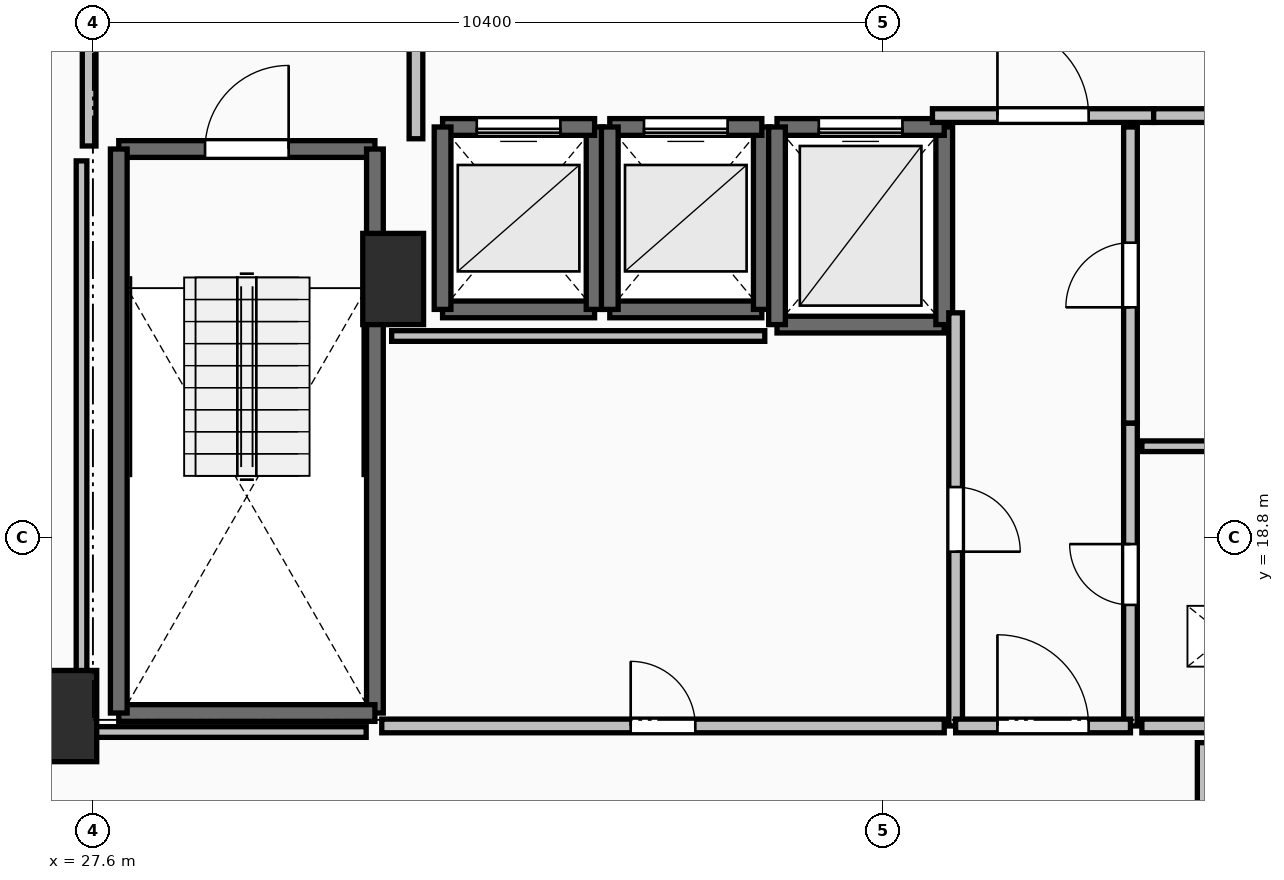
"""IFC4 building model, lengths in metres.
Left out: names, types, materials, properties, quantities, classifications, styles, units other than length and angle.
Written with IfcOpenShell. Run it as: python <this file> out.ifc"""

import sys

from ifc_helpers import new_model, si_unit, direction, frame, frame_2d, origin, origin_2d, place, context, subcontext, project, spatial, rectangle, extrude, element, fill, save


model = new_model("IFC4")
c1 = context("Model", 3, precision=1e-05, world=origin(), true_north=direction((0.0, 1.0)))
c2 = subcontext(c1, "Body", "Model", "MODEL_VIEW")
j1 = project(units=[si_unit("LENGTHUNIT", "METRE"), si_unit("PLANEANGLEUNIT", "RADIAN")], contexts=[c1])
p1 = place(None, origin())
s1 = spatial("IfcSite", under=j1, at=p1, CompositionType="ELEMENT")
p2 = place(p1, origin())
s2 = spatial("IfcBuilding", under=s1, at=p2, CompositionType="ELEMENT")
p3 = place(p2, frame((0.0, 0.0, 150.1)))
s3 = spatial("IfcBuildingStorey", under=s2, at=p3, CompositionType="ELEMENT", Elevation=150.1)
for number, where, z_axis, x_axis in (
    (1, (27.25, 16.45, 0.0), (0.0, 0.0, 1.0), (1.0, 0.0, 0.0)),
    (2, (31.55, 22.2, 0.0), (0.0, 0.0, 1.0), (1.0, 0.0, 0.0)),
):
    element("IfcColumn", number, at=place(p3, frame(where, z_axis=z_axis, x_axis=x_axis)), inside=s3, PredefinedType="PILASTER", context=c2, shape_type="SweptSolid", body=[
        extrude(rectangle(XDim=0.8, YDim=1.2, at=origin_2d()), origin(), (0.0, 0.0, 1.0), 3.5),
    ])
p4 = place(p3, frame((27.94, 23.91, 0.0), z_axis=(0.0, 0.0, 1.0), x_axis=(1.0, 0.0, 0.0)))
e3 = element("IfcWall", 3, at=p4, inside=s3, PredefinedType="SOLIDWALL", context=c2, shape_type="SweptSolid", body=[
    extrude(rectangle(XDim=3.37, YDim=0.22, at=frame_2d((1.685, 0.0))), origin(), (0.0, 0.0, 1.0), 3.24),
])
p5 = place(p4, frame((1.135, 0.0, 0.0)))
e4 = element("IfcOpeningElement", 4, at=p5, cuts=e3, PredefinedType="OPENING", context=c2, shape_type="SweptSolid", body=[
    extrude(rectangle(XDim=1.1, YDim=2.15, at=frame_2d((0.55, 1.075))), frame((0.0, 0.125, 0.0), z_axis=(0.0, -1.0, 0.0), x_axis=(1.0, 0.0, 0.0)), (0.0, 0.0, 1.0), 0.25),
])
p6 = place(p3, frame((31.31, 23.91, 0.0), z_axis=(0.0, 0.0, 1.0), x_axis=(0.0, -1.0, 0.0)))
e5 = element("IfcWall", 5, at=p6, inside=s3, PredefinedType="SOLIDWALL", context=c2, shape_type="SweptSolid", body=[
    extrude(rectangle(XDim=7.42, YDim=0.22, at=frame_2d((3.71, 0.0))), origin(), (0.0, 0.0, 1.0), 3.24),
])
p7 = place(p3, frame((31.31, 16.49, 0.0), z_axis=(0.0, 0.0, 1.0), x_axis=(-1.0, 0.0, 0.0)))
e6 = element("IfcWall", 6, at=p7, inside=s3, PredefinedType="SOLIDWALL", context=c2, shape_type="SweptSolid", body=[
    extrude(rectangle(XDim=3.37, YDim=0.22, at=frame_2d((1.685, 0.0))), origin(), (0.0, 0.0, 1.0), 3.24),
])
p8 = place(p3, frame((27.94, 16.49, 0.0), z_axis=(0.0, 0.0, 1.0), x_axis=(0.0, 1.0, 0.0)))
e7 = element("IfcWall", 7, at=p8, inside=s3, PredefinedType="SOLIDWALL", context=c2, shape_type="SweptSolid", body=[
    extrude(rectangle(XDim=7.42, YDim=0.22, at=frame_2d((3.71, 0.0))), origin(), (0.0, 0.0, 1.0), 3.24),
])
p9 = place(p3, frame((32.2, 21.8, 0.0), z_axis=(0.0, 0.0, 1.0), x_axis=(1.0, 0.0, 0.0)))
e8 = element("IfcWall", 8, at=p9, inside=s3, PredefinedType="SOLIDWALL", context=c2, shape_type="SweptSolid", body=[
    extrude(rectangle(XDim=2.0, YDim=0.22, at=frame_2d((1.0, 0.0))), origin(), (0.0, 0.0, 1.0), 3.24),
])
p10 = place(p3, frame((34.2, 21.8, 0.0), z_axis=(0.0, 0.0, 1.0), x_axis=(0.0, 1.0, 0.0)))
e9 = element("IfcWall", 9, at=p10, inside=s3, PredefinedType="SOLIDWALL", context=c2, shape_type="SweptSolid", body=[
    extrude(rectangle(XDim=2.4, YDim=0.22, at=frame_2d((1.2, 0.0))), origin(), (0.0, 0.0, 1.0), 3.24),
])
p11 = place(p3, frame((34.2, 24.2, 0.0), z_axis=(0.0, 0.0, 1.0), x_axis=(-1.0, 0.0, 0.0)))
e10 = element("IfcWall", 10, at=p11, inside=s3, PredefinedType="SOLIDWALL", context=c2, shape_type="SweptSolid", body=[
    extrude(rectangle(XDim=2.0, YDim=0.22, at=frame_2d((1.0, 0.0))), origin(), (0.0, 0.0, 1.0), 3.24),
])
p12 = place(p11, frame((0.45, 0.0, 0.0)))
e11 = element("IfcOpeningElement", 11, at=p12, cuts=e10, PredefinedType="OPENING", context=c2, shape_type="SweptSolid", body=[
    extrude(rectangle(XDim=1.1, YDim=2.2, at=frame_2d((0.55, 1.1))), frame((0.0, 0.125, 0.0), z_axis=(0.0, -1.0, 0.0), x_axis=(1.0, 0.0, 0.0)), (0.0, 0.0, 1.0), 0.25),
])
p13 = place(p3, frame((32.2, 24.2, 0.0), z_axis=(0.0, 0.0, 1.0), x_axis=(0.0, -1.0, 0.0)))
e12 = element("IfcWall", 12, at=p13, inside=s3, PredefinedType="SOLIDWALL", context=c2, shape_type="SweptSolid", body=[
    extrude(rectangle(XDim=2.4, YDim=0.22, at=frame_2d((1.2, 0.0))), origin(), (0.0, 0.0, 1.0), 3.24),
])
p14 = place(p3, frame((34.4, 21.8, 0.0), z_axis=(0.0, 0.0, 1.0), x_axis=(1.0, 0.0, 0.0)))
e13 = element("IfcWall", 13, at=p14, inside=s3, PredefinedType="SOLIDWALL", context=c2, shape_type="SweptSolid", body=[
    extrude(rectangle(XDim=2.0, YDim=0.22, at=frame_2d((1.0, 0.0))), origin(), (0.0, 0.0, 1.0), 3.24),
])
p15 = place(p3, frame((36.4, 21.8, 0.0), z_axis=(0.0, 0.0, 1.0), x_axis=(0.0, 1.0, 0.0)))
e14 = element("IfcWall", 14, at=p15, inside=s3, PredefinedType="SOLIDWALL", context=c2, shape_type="SweptSolid", body=[
    extrude(rectangle(XDim=2.4, YDim=0.22, at=frame_2d((1.2, 0.0))), origin(), (0.0, 0.0, 1.0), 3.24),
])
p16 = place(p3, frame((36.4, 24.2, 0.0), z_axis=(0.0, 0.0, 1.0), x_axis=(-1.0, 0.0, 0.0)))
e15 = element("IfcWall", 15, at=p16, inside=s3, PredefinedType="SOLIDWALL", context=c2, shape_type="SweptSolid", body=[
    extrude(rectangle(XDim=2.0, YDim=0.22, at=frame_2d((1.0, 0.0))), origin(), (0.0, 0.0, 1.0), 3.24),
])
p17 = place(p16, frame((0.45, 0.0, 0.0)))
e16 = element("IfcOpeningElement", 16, at=p17, cuts=e15, PredefinedType="OPENING", context=c2, shape_type="SweptSolid", body=[
    extrude(rectangle(XDim=1.1, YDim=2.2, at=frame_2d((0.55, 1.1))), frame((0.0, 0.125, 0.0), z_axis=(0.0, -1.0, 0.0), x_axis=(1.0, 0.0, 0.0)), (0.0, 0.0, 1.0), 0.25),
])
p18 = place(p3, frame((34.4, 24.2, 0.0), z_axis=(0.0, 0.0, 1.0), x_axis=(0.0, -1.0, 0.0)))
e17 = element("IfcWall", 17, at=p18, inside=s3, PredefinedType="SOLIDWALL", context=c2, shape_type="SweptSolid", body=[
    extrude(rectangle(XDim=2.4, YDim=0.22, at=frame_2d((1.2, 0.0))), origin(), (0.0, 0.0, 1.0), 3.24),
])
p19 = place(p3, frame((36.6, 21.6, 0.0), z_axis=(0.0, 0.0, 1.0), x_axis=(1.0, 0.0, 0.0)))
e18 = element("IfcWall", 18, at=p19, inside=s3, PredefinedType="SOLIDWALL", context=c2, shape_type="SweptSolid", body=[
    extrude(rectangle(XDim=2.2, YDim=0.22, at=frame_2d((1.1, 0.0))), origin(), (0.0, 0.0, 1.0), 3.24),
])
p20 = place(p3, frame((38.8, 21.6, 0.0), z_axis=(0.0, 0.0, 1.0), x_axis=(0.0, 1.0, 0.0)))
e19 = element("IfcWall", 19, at=p20, inside=s3, PredefinedType="SOLIDWALL", context=c2, shape_type="SweptSolid", body=[
    extrude(rectangle(XDim=2.6, YDim=0.22, at=frame_2d((1.3, 0.0))), origin(), (0.0, 0.0, 1.0), 3.24),
])
p21 = place(p3, frame((38.8, 24.2, 0.0), z_axis=(0.0, 0.0, 1.0), x_axis=(-1.0, 0.0, 0.0)))
e20 = element("IfcWall", 20, at=p21, inside=s3, PredefinedType="SOLIDWALL", context=c2, shape_type="SweptSolid", body=[
    extrude(rectangle(XDim=2.2, YDim=0.22, at=frame_2d((1.1, 0.0))), origin(), (0.0, 0.0, 1.0), 3.24),
])
p22 = place(p21, frame((0.55, 0.0, 0.0)))
e21 = element("IfcOpeningElement", 21, at=p22, cuts=e20, PredefinedType="OPENING", context=c2, shape_type="SweptSolid", body=[
    extrude(rectangle(XDim=1.1, YDim=2.2, at=frame_2d((0.55, 1.1))), frame((0.0, 0.125, 0.0), z_axis=(0.0, -1.0, 0.0), x_axis=(1.0, 0.0, 0.0)), (0.0, 0.0, 1.0), 0.25),
])
p23 = place(p3, frame((36.6, 24.2, 0.0), z_axis=(0.0, 0.0, 1.0), x_axis=(0.0, -1.0, 0.0)))
e22 = element("IfcWall", 22, at=p23, inside=s3, PredefinedType="SOLIDWALL", context=c2, shape_type="SweptSolid", body=[
    extrude(rectangle(XDim=2.6, YDim=0.22, at=frame_2d((1.3, 0.0))), origin(), (0.0, 0.0, 1.0), 3.24),
])
p24 = place(p3, frame((31.85, 24.045, 0.0), z_axis=(0.0, 0.0, 1.0), x_axis=(0.0, 1.0, 0.0)))
e23 = element("IfcWall", 23, at=p24, inside=s3, PredefinedType="PARTITIONING", context=c2, shape_type="SweptSolid", body=[
    extrude(rectangle(XDim=3.91, YDim=0.18, at=frame_2d((1.955, 0.0))), origin(), (0.0, 0.0, 1.0), 3.24),
])
p25 = place(p24, frame((1.355, 0.0, 0.0)))
e24 = element("IfcOpeningElement", 24, at=p25, cuts=e23, PredefinedType="OPENING", context=c2, shape_type="SweptSolid", body=[
    extrude(rectangle(XDim=1.2, YDim=2.15, at=frame_2d((0.6, 1.075))), frame((0.0, 0.105, 0.0), z_axis=(0.0, -1.0, 0.0), x_axis=(1.0, 0.0, 0.0)), (0.0, 0.0, 1.0), 0.21),
])
p26 = place(p3, frame((27.55, 28.0, 0.0), z_axis=(0.0, 0.0, 1.0), x_axis=(0.0, -1.0, 0.0)))
e25 = element("IfcWall", 25, at=p26, inside=s3, PredefinedType="PARTITIONING", context=c2, shape_type="SweptSolid", body=[
    extrude(rectangle(XDim=4.05, YDim=0.18, at=frame_2d((2.025, 0.0))), origin(), (0.0, 0.0, 1.0), 3.24),
])
p27 = place(p26, frame((1.425, 0.0, 0.0)))
e26 = element("IfcOpeningElement", 26, at=p27, cuts=e25, PredefinedType="OPENING", context=c2, shape_type="SweptSolid", body=[
    extrude(rectangle(XDim=1.2, YDim=2.15, at=frame_2d((0.6, 1.075))), frame((0.0, 0.105, 0.0), z_axis=(0.0, -1.0, 0.0), x_axis=(1.0, 0.0, 0.0)), (0.0, 0.0, 1.0), 0.21),
])
p28 = place(p3, frame((38.645, 24.35, 0.0), z_axis=(0.0, 0.0, 1.0), x_axis=(1.0, 0.0, 0.0)))
e27 = element("IfcWall", 27, at=p28, inside=s3, PredefinedType="PARTITIONING", context=c2, shape_type="SweptSolid", body=[
    extrude(rectangle(XDim=2.91, YDim=0.18, at=frame_2d((1.455, 0.0))), origin(), (0.0, 0.0, 1.0), 3.24),
])
p29 = place(p28, frame((0.855, 0.0, 0.0)))
e28 = element("IfcOpeningElement", 28, at=p29, cuts=e27, PredefinedType="OPENING", context=c2, shape_type="SweptSolid", body=[
    extrude(rectangle(XDim=1.2, YDim=2.15, at=frame_2d((0.6, 1.075))), frame((0.0, 0.105, 0.0), z_axis=(0.0, -1.0, 0.0), x_axis=(1.0, 0.0, 0.0)), (0.0, 0.0, 1.0), 0.21),
])
p30 = place(p3, frame((41.555, 24.35, 0.0), z_axis=(0.0, 0.0, 1.0), x_axis=(1.0, 0.0, 0.0)))
e29 = element("IfcWall", 29, at=p30, inside=s3, PredefinedType="PARTITIONING", context=c2, shape_type="SweptSolid", body=[
    extrude(rectangle(XDim=2.445, YDim=0.18, at=frame_2d((1.223, 0.0))), origin(), (0.0, 0.0, 1.0), 3.24),
])
p31 = place(p30, frame((0.798, 0.0, 0.0)))
e30 = element("IfcOpeningElement", 30, at=p31, cuts=e29, PredefinedType="OPENING", context=c2, shape_type="SweptSolid", body=[
    extrude(rectangle(XDim=0.85, YDim=2.1, at=frame_2d((0.425, 1.05))), frame((0.0, 0.105, 0.0), z_axis=(0.0, -1.0, 0.0), x_axis=(1.0, 0.0, 0.0)), (0.0, 0.0, 1.0), 0.21),
])
p32 = place(p3, frame((41.25, 16.32, 0.0), z_axis=(0.0, 0.0, 1.0), x_axis=(0.0, 1.0, 0.0)))
e31 = element("IfcWall", 31, at=p32, inside=s3, PredefinedType="PARTITIONING", context=c2, shape_type="SweptSolid", body=[
    extrude(rectangle(XDim=3.985, YDim=0.18, at=frame_2d((1.992, 0.0))), origin(), (0.0, 0.0, 1.0), 3.24),
])
p33 = place(p32, frame((1.593, 0.0, 0.0)))
e32 = element("IfcOpeningElement", 32, at=p33, cuts=e31, PredefinedType="OPENING", context=c2, shape_type="SweptSolid", body=[
    extrude(rectangle(XDim=0.8, YDim=2.05, at=frame_2d((0.4, 1.025))), frame((0.0, 0.105, 0.0), z_axis=(0.0, -1.0, 0.0), x_axis=(1.0, 0.0, 0.0)), (0.0, 0.0, 1.0), 0.21),
])
p34 = place(p3, frame((41.25, 20.305, 0.0), z_axis=(0.0, 0.0, 1.0), x_axis=(0.0, 1.0, 0.0)))
e33 = element("IfcWall", 33, at=p34, inside=s3, PredefinedType="PARTITIONING", context=c2, shape_type="SweptSolid", body=[
    extrude(rectangle(XDim=3.895, YDim=0.18, at=frame_2d((1.948, 0.0))), origin(), (0.0, 0.0, 1.0), 3.24),
])
p35 = place(p34, frame((1.522, 0.0, 0.0)))
e34 = element("IfcOpeningElement", 34, at=p35, cuts=e33, PredefinedType="OPENING", context=c2, shape_type="SweptSolid", body=[
    extrude(rectangle(XDim=0.85, YDim=2.1, at=frame_2d((0.425, 1.05))), frame((0.0, 0.105, 0.0), z_axis=(0.0, -1.0, 0.0), x_axis=(1.0, 0.0, 0.0)), (0.0, 0.0, 1.0), 0.21),
])
p36 = place(p3, frame((38.95, 21.755, 0.0), z_axis=(0.0, 0.0, 1.0), x_axis=(0.0, -1.0, 0.0)))
e35 = element("IfcWall", 35, at=p36, inside=s3, PredefinedType="PARTITIONING", context=c2, shape_type="SweptSolid", body=[
    extrude(rectangle(XDim=5.435, YDim=0.18, at=frame_2d((2.717, 0.0))), origin(), (0.0, 0.0, 1.0), 3.24),
])
p37 = place(p36, frame((2.292, 0.0, 0.0)))
e36 = element("IfcOpeningElement", 36, at=p37, cuts=e35, PredefinedType="OPENING", context=c2, shape_type="SweptSolid", body=[
    extrude(rectangle(XDim=0.85, YDim=2.1, at=frame_2d((0.425, 1.05))), frame((0.0, 0.105, 0.0), z_axis=(0.0, -1.0, 0.0), x_axis=(1.0, 0.0, 0.0)), (0.0, 0.0, 1.0), 0.21),
])
p38 = place(p3, frame((38.95, 16.32, 0.0), z_axis=(0.0, 0.0, 1.0), x_axis=(1.0, 0.0, 0.0)))
e37 = element("IfcWall", 37, at=p38, inside=s3, PredefinedType="PARTITIONING", context=c2, shape_type="SweptSolid", body=[
    extrude(rectangle(XDim=2.3, YDim=0.18, at=frame_2d((1.15, 0.0))), origin(), (0.0, 0.0, 1.0), 3.24),
])
p39 = place(p38, frame((0.55, 0.0, 0.0)))
e38 = element("IfcOpeningElement", 38, at=p39, cuts=e37, PredefinedType="OPENING", context=c2, shape_type="SweptSolid", body=[
    extrude(rectangle(XDim=1.2, YDim=2.15, at=frame_2d((0.6, 1.075))), frame((0.0, 0.105, 0.0), z_axis=(0.0, -1.0, 0.0), x_axis=(1.0, 0.0, 0.0)), (0.0, 0.0, 1.0), 0.21),
])
p40 = place(p3, frame((44.6, 20.0, 0.0), z_axis=(0.0, 0.0, 1.0), x_axis=(-1.0, 0.0, 0.0)))
e39 = element("IfcWall", 39, at=p40, inside=s3, PredefinedType="PARTITIONING", context=c2, shape_type="SweptSolid", body=[
    extrude(rectangle(XDim=3.2, YDim=0.14, at=frame_2d((1.6, 0.0))), origin(), (0.0, 0.0, 1.0), 3.24),
])
p41 = place(p3, frame((41.4, 16.32, 0.0), z_axis=(0.0, 0.0, 1.0), x_axis=(1.0, 0.0, 0.0)))
e40 = element("IfcWall", 40, at=p41, inside=s3, PredefinedType="PARTITIONING", context=c2, shape_type="SweptSolid", body=[
    extrude(rectangle(XDim=3.2, YDim=0.18, at=frame_2d((1.6, 0.0))), origin(), (0.0, 0.0, 1.0), 3.24),
])
p42 = place(p41, frame((1.2, 0.0, 0.0)))
e41 = element("IfcOpeningElement", 41, at=p42, cuts=e40, PredefinedType="OPENING", context=c2, shape_type="SweptSolid", body=[
    extrude(rectangle(XDim=0.8, YDim=2.05, at=frame_2d((0.4, 1.025))), frame((0.0, 0.105, 0.0), z_axis=(0.0, -1.0, 0.0), x_axis=(1.0, 0.0, 0.0)), (0.0, 0.0, 1.0), 0.21),
])
p43 = place(p3, frame((31.4, 16.32, 0.0), z_axis=(0.0, 0.0, 1.0), x_axis=(1.0, 0.0, 0.0)))
e42 = element("IfcWall", 42, at=p43, inside=s3, PredefinedType="PARTITIONING", context=c2, shape_type="SweptSolid", body=[
    extrude(rectangle(XDim=7.4, YDim=0.18, at=frame_2d((3.7, 0.0))), origin(), (0.0, 0.0, 1.0), 3.24),
])
p44 = place(p43, frame((3.275, 0.0, 0.0)))
e43 = element("IfcOpeningElement", 43, at=p44, cuts=e42, PredefinedType="OPENING", context=c2, shape_type="SweptSolid", body=[
    extrude(rectangle(XDim=0.85, YDim=2.1, at=frame_2d((0.425, 1.05))), frame((0.0, 0.105, 0.0), z_axis=(0.0, -1.0, 0.0), x_axis=(1.0, 0.0, 0.0)), (0.0, 0.0, 1.0), 0.21),
])
p45 = place(p3, frame((36.439, 21.45, 0.0), z_axis=(0.0, 0.0, 1.0), x_axis=(-1.0, 0.0, 0.0)))
e44 = element("IfcWall", 44, at=p45, inside=s3, PredefinedType="PARTITIONING", context=c2, shape_type="SweptSolid", body=[
    extrude(rectangle(XDim=4.909, YDim=0.14, at=frame_2d((2.455, 0.0))), origin(), (0.0, 0.0, 1.0), 3.24),
])
p46 = place(p3, frame((27.45, 23.754, 0.0), z_axis=(0.0, 0.0, 1.0), x_axis=(0.0, -1.0, 0.0)))
e45 = element("IfcWall", 45, at=p46, inside=s3, PredefinedType="PARTITIONING", context=c2, shape_type="SweptSolid", body=[
    extrude(rectangle(XDim=7.514, YDim=0.14, at=frame_2d((3.757, 0.0))), origin(), (0.0, 0.0, 1.0), 2.432),
])
p47 = place(p3, frame((27.45, 16.24, 0.0), z_axis=(0.0, 0.0, 1.0), x_axis=(1.0, 0.0, 0.0)))
e46 = element("IfcWall", 46, at=p47, inside=s3, PredefinedType="PARTITIONING", context=c2, shape_type="SweptSolid", body=[
    extrude(rectangle(XDim=3.745, YDim=0.14, at=frame_2d((1.873, 0.0))), origin(), (0.0, 0.0, 1.0), 2.432),
])
p48 = place(p3, frame((42.2, 16.1, 0.0), z_axis=(0.0, 0.0, 1.0), x_axis=(0.0, -1.0, 0.0)))
e47 = element("IfcWall", 47, at=p48, inside=s3, PredefinedType="PARTITIONING", context=c2, shape_type="SweptSolid", body=[
    extrude(rectangle(XDim=1.83, YDim=0.14, at=frame_2d((0.915, 0.0))), origin(), (0.0, 0.0, 1.0), 2.886),
])
p49 = place(p5, origin())
e48 = element("IfcDoor", 48, at=p49, inside=s3, OperationType="SINGLE_SWING_RIGHT", PredefinedType="DOOR", context=c2, shape_type="SweptSolid", body=[
    extrude(rectangle(XDim=1.1, YDim=2.15, at=frame_2d((0.55, 1.075))), frame((0.0, 0.025, 0.0), z_axis=(0.0, -1.0, 0.0), x_axis=(1.0, 0.0, 0.0)), (0.0, 0.0, 1.0), 0.05),
])
fill(e4, e48)
p50 = place(p12, origin())
e49 = element("IfcDoor", 49, at=p50, inside=s3, OperationType="SLIDING_TO_LEFT", PredefinedType="DOOR", context=c2, shape_type="SweptSolid", body=[
    extrude(rectangle(XDim=1.1, YDim=2.2, at=frame_2d((0.55, 1.1))), frame((0.0, 0.025, 0.0), z_axis=(0.0, -1.0, 0.0), x_axis=(1.0, 0.0, 0.0)), (0.0, 0.0, 1.0), 0.05),
])
fill(e11, e49)
p51 = place(p17, origin())
e50 = element("IfcDoor", 50, at=p51, inside=s3, OperationType="SLIDING_TO_LEFT", PredefinedType="DOOR", context=c2, shape_type="SweptSolid", body=[
    extrude(rectangle(XDim=1.1, YDim=2.2, at=frame_2d((0.55, 1.1))), frame((0.0, 0.025, 0.0), z_axis=(0.0, -1.0, 0.0), x_axis=(1.0, 0.0, 0.0)), (0.0, 0.0, 1.0), 0.05),
])
fill(e16, e50)
p52 = place(p22, origin())
e51 = element("IfcDoor", 51, at=p52, inside=s3, OperationType="SLIDING_TO_LEFT", PredefinedType="DOOR", context=c2, shape_type="SweptSolid", body=[
    extrude(rectangle(XDim=1.1, YDim=2.2, at=frame_2d((0.55, 1.1))), frame((0.0, 0.025, 0.0), z_axis=(0.0, -1.0, 0.0), x_axis=(1.0, 0.0, 0.0)), (0.0, 0.0, 1.0), 0.05),
])
fill(e21, e51)
p53 = place(p29, origin())
e52 = element("IfcDoor", 52, at=p53, inside=s3, OperationType="SINGLE_SWING_LEFT", PredefinedType="DOOR", context=c2, shape_type="SweptSolid", body=[
    extrude(rectangle(XDim=1.2, YDim=2.15, at=frame_2d((0.6, 1.075))), frame((0.0, 0.025, 0.0), z_axis=(0.0, -1.0, 0.0), x_axis=(1.0, 0.0, 0.0)), (0.0, 0.0, 1.0), 0.05),
])
fill(e28, e52)
p54 = place(p33, origin())
e53 = element("IfcDoor", 53, at=p54, inside=s3, OperationType="SINGLE_SWING_RIGHT", PredefinedType="DOOR", context=c2, shape_type="SweptSolid", body=[
    extrude(rectangle(XDim=0.8, YDim=2.05, at=frame_2d((0.4, 1.025))), frame((0.0, 0.025, 0.0), z_axis=(0.0, -1.0, 0.0), x_axis=(1.0, 0.0, 0.0)), (0.0, 0.0, 1.0), 0.05),
])
fill(e32, e53)
p55 = place(p35, origin())
e54 = element("IfcDoor", 54, at=p55, inside=s3, OperationType="SINGLE_SWING_LEFT", PredefinedType="DOOR", context=c2, shape_type="SweptSolid", body=[
    extrude(rectangle(XDim=0.85, YDim=2.1, at=frame_2d((0.425, 1.05))), frame((0.0, 0.025, 0.0), z_axis=(0.0, -1.0, 0.0), x_axis=(1.0, 0.0, 0.0)), (0.0, 0.0, 1.0), 0.05),
])
fill(e34, e54)
p56 = place(p37, origin())
e55 = element("IfcDoor", 55, at=p56, inside=s3, OperationType="SINGLE_SWING_RIGHT", PredefinedType="DOOR", context=c2, shape_type="SweptSolid", body=[
    extrude(rectangle(XDim=0.85, YDim=2.1, at=frame_2d((0.425, 1.05))), frame((0.0, 0.025, 0.0), z_axis=(0.0, -1.0, 0.0), x_axis=(1.0, 0.0, 0.0)), (0.0, 0.0, 1.0), 0.05),
])
fill(e36, e55)
p57 = place(p39, origin())
e56 = element("IfcDoor", 56, at=p57, inside=s3, OperationType="SINGLE_SWING_LEFT", PredefinedType="DOOR", context=c2, shape_type="SweptSolid", body=[
    extrude(rectangle(XDim=1.2, YDim=2.15, at=frame_2d((0.6, 1.075))), frame((0.0, 0.025, 0.0), z_axis=(0.0, -1.0, 0.0), x_axis=(1.0, 0.0, 0.0)), (0.0, 0.0, 1.0), 0.05),
])
fill(e38, e56)
p58 = place(p44, origin())
e57 = element("IfcDoor", 57, at=p58, inside=s3, OperationType="SINGLE_SWING_LEFT", PredefinedType="DOOR", context=c2, shape_type="SweptSolid", body=[
    extrude(rectangle(XDim=0.85, YDim=2.1, at=frame_2d((0.425, 1.05))), frame((0.0, 0.025, 0.0), z_axis=(0.0, -1.0, 0.0), x_axis=(1.0, 0.0, 0.0)), (0.0, 0.0, 1.0), 0.05),
])
fill(e43, e57)
save(model, sys.argv[1])
